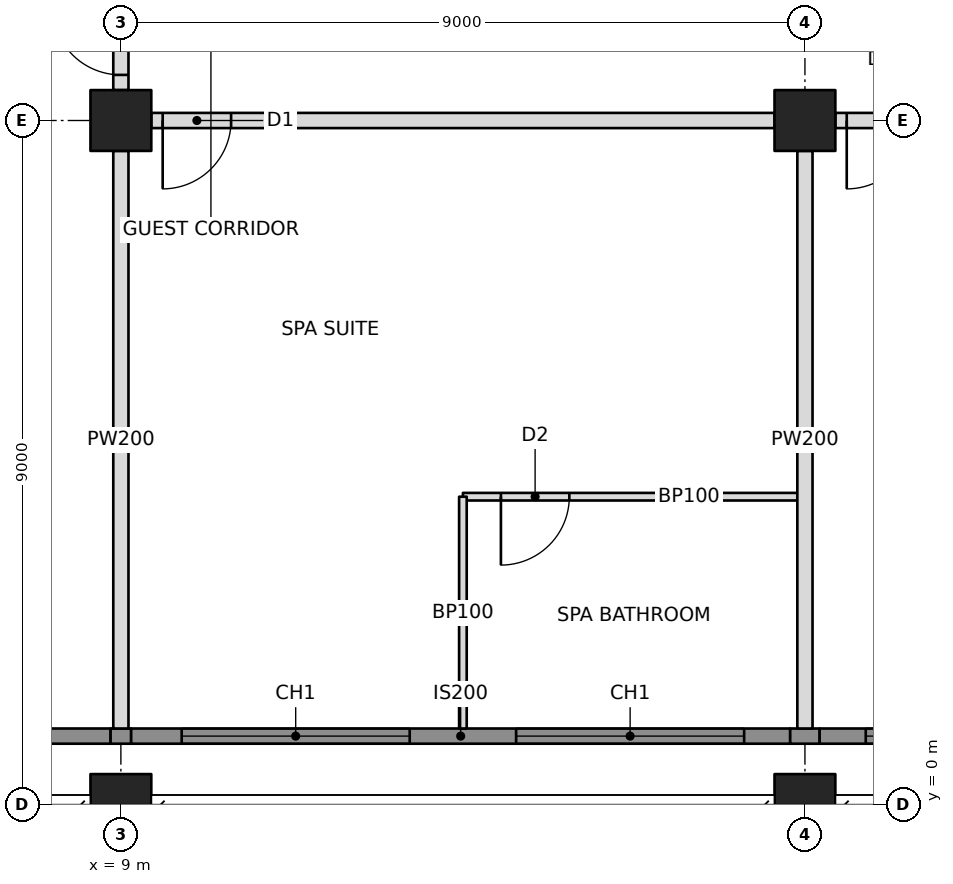
"""IFC4 building model, lengths in metres.
Left out: names, types, materials, properties, quantities, classifications, styles, units other than length and angle.
Written with IfcOpenShell. Run it as: python <this file> out.ifc"""

import sys

from ifc_helpers import new_model, si_unit, direction, frame, frame_2d, origin, origin_2d, place, context, subcontext, project, spatial, rectangle, hollow_rectangle, extrude, element, fill, save


model = new_model("IFC4")
c1 = context("Model", 3, precision=1e-05, world=origin(), true_north=direction((0.0, 1.0)))
c2 = subcontext(c1, "Body", "Model", "MODEL_VIEW")
j1 = project(units=[si_unit("LENGTHUNIT", "METRE"), si_unit("PLANEANGLEUNIT", "RADIAN")], contexts=[c1])
p1 = place(None, origin())
s1 = spatial("IfcSite", under=j1, at=p1, CompositionType="ELEMENT")
p2 = place(p1, origin())
s2 = spatial("IfcBuilding", under=s1, at=p2, CompositionType="ELEMENT")
p3 = place(p2, frame((0.0, 0.0, 241.0)))
s3 = spatial("IfcBuildingStorey", under=s2, at=p3, CompositionType="ELEMENT", Elevation=241.0)
p4 = place(p3, frame((9.0, 0.0, 0.0), z_axis=(0.0, 0.0, 1.0), x_axis=(1.0, 0.0, 0.0)))
e1 = element("IfcColumn", 1, at=p4, inside=s3, PredefinedType="COLUMN", context=c2, shape_type="SweptSolid", body=[
    extrude(hollow_rectangle(XDim=0.8, YDim=0.8, WallThickness=0.05, at=origin_2d()), origin(), (0.0, 0.0, 1.0), 3.6),
])
p5 = place(p3, frame((9.0, 9.0, 0.0), z_axis=(0.0, 0.0, 1.0), x_axis=(1.0, 0.0, 0.0)))
e2 = element("IfcColumn", 2, at=p5, inside=s3, PredefinedType="COLUMN", context=c2, shape_type="SweptSolid", body=[
    extrude(hollow_rectangle(XDim=0.8, YDim=0.8, WallThickness=0.04, at=origin_2d()), origin(), (0.0, 0.0, 1.0), 3.6),
])
p6 = place(p3, frame((18.0, 0.0, 0.0), z_axis=(0.0, 0.0, 1.0), x_axis=(1.0, 0.0, 0.0)))
e3 = element("IfcColumn", 3, at=p6, inside=s3, PredefinedType="COLUMN", context=c2, shape_type="SweptSolid", body=[
    extrude(hollow_rectangle(XDim=0.8, YDim=0.8, WallThickness=0.05, at=origin_2d()), origin(), (0.0, 0.0, 1.0), 3.6),
])
p7 = place(p3, frame((18.0, 9.0, 0.0), z_axis=(0.0, 0.0, 1.0), x_axis=(1.0, 0.0, 0.0)))
e4 = element("IfcColumn", 4, at=p7, inside=s3, PredefinedType="COLUMN", context=c2, shape_type="SweptSolid", body=[
    extrude(hollow_rectangle(XDim=0.8, YDim=0.8, WallThickness=0.04, at=origin_2d()), origin(), (0.0, 0.0, 1.0), 3.6),
])
p8 = place(p3, frame((3.0, 0.9, 0.0), z_axis=(0.0, 0.0, 1.0), x_axis=(1.0, 0.0, 0.0)))
e5 = element("IfcWall", 5, at=p8, inside=s3, PredefinedType="SOLIDWALL", context=c2, shape_type="SweptSolid", body=[
    extrude(rectangle(XDim=5.865, YDim=0.2, at=frame_2d((2.932, 0.0))), origin(), (0.0, 0.0, 1.0), 3.4),
])
p9 = place(p8, frame((1.45, 0.0, 0.6)))
e6 = element("IfcOpeningElement", 6, at=p9, cuts=e5, PredefinedType="OPENING", context=c2, shape_type="SweptSolid", body=[
    extrude(rectangle(XDim=3.0, YDim=2.2, at=frame_2d((1.5, 1.1))), frame((0.0, 0.11, 0.0), z_axis=(0.0, -1.0, 0.0), x_axis=(1.0, 0.0, 0.0)), (0.0, 0.0, 1.0), 0.22),
])
p10 = place(p3, frame((9.4, 9.0, 0.0), z_axis=(0.0, 0.0, 1.0), x_axis=(1.0, 0.0, 0.0)))
e7 = element("IfcWall", 7, at=p10, inside=s3, PredefinedType="PARTITIONING", context=c2, shape_type="SweptSolid", body=[
    extrude(rectangle(XDim=8.2, YDim=0.2, at=frame_2d((4.1, 0.0))), origin(), (0.0, 0.0, 1.0), 2.605),
])
p11 = place(p10, frame((0.15, 0.0, 0.0)))
e8 = element("IfcOpeningElement", 8, at=p11, cuts=e7, PredefinedType="OPENING", context=c2, shape_type="SweptSolid", body=[
    extrude(rectangle(XDim=0.9, YDim=2.1, at=frame_2d((0.45, 1.05))), frame((0.0, 0.11, 0.0), z_axis=(0.0, -1.0, 0.0), x_axis=(1.0, 0.0, 0.0)), (0.0, 0.0, 1.0), 0.22),
])
p12 = place(p3, frame((18.4, 9.0, 0.0), z_axis=(0.0, 0.0, 1.0), x_axis=(1.0, 0.0, 0.0)))
e9 = element("IfcWall", 9, at=p12, inside=s3, PredefinedType="PARTITIONING", context=c2, shape_type="SweptSolid", body=[
    extrude(rectangle(XDim=8.2, YDim=0.2, at=frame_2d((4.1, 0.0))), origin(), (0.0, 0.0, 1.0), 2.605),
])
p13 = place(p12, frame((0.15, 0.0, 0.0)))
e10 = element("IfcOpeningElement", 10, at=p13, cuts=e9, PredefinedType="OPENING", context=c2, shape_type="SweptSolid", body=[
    extrude(rectangle(XDim=0.9, YDim=2.1, at=frame_2d((0.45, 1.05))), frame((0.0, 0.11, 0.0), z_axis=(0.0, -1.0, 0.0), x_axis=(1.0, 0.0, 0.0)), (0.0, 0.0, 1.0), 0.22),
])
p14 = place(p3, frame((9.0, 8.6, 0.0), z_axis=(0.0, 0.0, 1.0), x_axis=(0.0, -1.0, 0.0)))
e11 = element("IfcWall", 11, at=p14, inside=s3, PredefinedType="PARTITIONING", context=c2, shape_type="SweptSolid", body=[
    extrude(rectangle(XDim=7.6, YDim=0.2, at=frame_2d((3.8, 0.0))), origin(), (0.0, 0.0, 1.0), 2.638),
])
p15 = place(p3, frame((18.0, 8.6, 0.0), z_axis=(0.0, 0.0, 1.0), x_axis=(0.0, -1.0, 0.0)))
e12 = element("IfcWall", 12, at=p15, inside=s3, PredefinedType="PARTITIONING", context=c2, shape_type="SweptSolid", body=[
    extrude(rectangle(XDim=7.6, YDim=0.2, at=frame_2d((3.8, 0.0))), origin(), (0.0, 0.0, 1.0), 2.605),
])
p16 = place(p3, frame((13.5, 4.05, 0.0), z_axis=(0.0, 0.0, 1.0), x_axis=(1.0, 0.0, 0.0)))
e13 = element("IfcWall", 13, at=p16, inside=s3, PredefinedType="PARTITIONING", context=c2, shape_type="SweptSolid", body=[
    extrude(rectangle(XDim=4.4, YDim=0.1, at=frame_2d((2.2, 0.0))), origin(), (0.0, 0.0, 1.0), 2.604),
])
p17 = place(p16, frame((0.5, 0.0, 0.0)))
e14 = element("IfcOpeningElement", 14, at=p17, cuts=e13, PredefinedType="OPENING", context=c2, shape_type="SweptSolid", body=[
    extrude(rectangle(XDim=0.9, YDim=2.1, at=frame_2d((0.45, 1.05))), frame((0.0, 0.06, 0.0), z_axis=(0.0, -1.0, 0.0), x_axis=(1.0, 0.0, 0.0)), (0.0, 0.0, 1.0), 0.12),
])
p18 = place(p3, frame((13.5, 4.05, 0.0), z_axis=(0.0, 0.0, 1.0), x_axis=(0.0, -1.0, 0.0)))
e15 = element("IfcWall", 15, at=p18, inside=s3, PredefinedType="PARTITIONING", context=c2, shape_type="SweptSolid", body=[
    extrude(rectangle(XDim=3.05, YDim=0.1, at=frame_2d((1.525, 0.0))), origin(), (0.0, 0.0, 1.0), 3.4),
])
p19 = place(p3, frame((9.0, 9.4, 0.0), z_axis=(0.0, 0.0, 1.0), x_axis=(0.0, 1.0, 0.0)))
e16 = element("IfcWall", 16, at=p19, inside=s3, PredefinedType="PARTITIONING", context=c2, shape_type="SweptSolid", body=[
    extrude(rectangle(XDim=1.3, YDim=0.2, at=frame_2d((0.65, 0.0))), origin(), (0.0, 0.0, 1.0), 2.605),
])
p20 = place(p19, frame((0.2, 0.0, 0.0)))
e17 = element("IfcOpeningElement", 17, at=p20, cuts=e16, PredefinedType="OPENING", context=c2, shape_type="SweptSolid", body=[
    extrude(rectangle(XDim=0.9, YDim=2.1, at=frame_2d((0.45, 1.05))), frame((0.0, 0.11, 0.0), z_axis=(0.0, -1.0, 0.0), x_axis=(1.0, 0.0, 0.0)), (0.0, 0.0, 1.0), 0.22),
])
p21 = place(p3, frame((8.865, 0.9, 0.0), z_axis=(0.0, 0.0, 1.0), x_axis=(1.0, 0.0, 0.0)))
e18 = element("IfcWall", 18, at=p21, inside=s3, PredefinedType="SOLIDWALL", context=c2, shape_type="SweptSolid", body=[
    extrude(rectangle(XDim=0.271, YDim=0.2, at=frame_2d((0.135, 0.0))), origin(), (0.0, 0.0, 1.0), 2.638),
])
p22 = place(p3, frame((9.135, 0.9, 0.0), z_axis=(0.0, 0.0, 1.0), x_axis=(1.0, 0.0, 0.0)))
e19 = element("IfcWall", 19, at=p22, inside=s3, PredefinedType="SOLIDWALL", context=c2, shape_type="SweptSolid", body=[
    extrude(rectangle(XDim=8.671, YDim=0.2, at=frame_2d((4.335, 0.0))), origin(), (0.0, 0.0, 1.0), 3.4),
])
p23 = place(p22, frame((0.665, 0.0, 0.6)))
e20 = element("IfcOpeningElement", 20, at=p23, cuts=e19, PredefinedType="OPENING", context=c2, shape_type="SweptSolid", body=[
    extrude(rectangle(XDim=3.0, YDim=2.2, at=frame_2d((1.5, 1.1))), frame((0.0, 0.11, 0.0), z_axis=(0.0, -1.0, 0.0), x_axis=(1.0, 0.0, 0.0)), (0.0, 0.0, 1.0), 0.22),
])
p24 = place(p22, frame((5.065, 0.0, 0.6)))
e21 = element("IfcOpeningElement", 21, at=p24, cuts=e19, PredefinedType="OPENING", context=c2, shape_type="SweptSolid", body=[
    extrude(rectangle(XDim=3.0, YDim=2.2, at=frame_2d((1.5, 1.1))), frame((0.0, 0.11, 0.0), z_axis=(0.0, -1.0, 0.0), x_axis=(1.0, 0.0, 0.0)), (0.0, 0.0, 1.0), 0.22),
])
p25 = place(p3, frame((17.806, 0.9, 0.0), z_axis=(0.0, 0.0, 1.0), x_axis=(1.0, 0.0, 0.0)))
e22 = element("IfcWall", 22, at=p25, inside=s3, PredefinedType="SOLIDWALL", context=c2, shape_type="SweptSolid", body=[
    extrude(rectangle(XDim=0.388, YDim=0.2, at=frame_2d((0.194, 0.0))), origin(), (0.0, 0.0, 1.0), 2.604),
])
p26 = place(p3, frame((18.194, 0.9, 0.0), z_axis=(0.0, 0.0, 1.0), x_axis=(1.0, 0.0, 0.0)))
e23 = element("IfcWall", 23, at=p26, inside=s3, PredefinedType="SOLIDWALL", context=c2, shape_type="SweptSolid", body=[
    extrude(rectangle(XDim=8.612, YDim=0.2, at=frame_2d((4.306, 0.0))), origin(), (0.0, 0.0, 1.0), 3.4),
])
p27 = place(p26, frame((0.606, 0.0, 0.6)))
e24 = element("IfcOpeningElement", 24, at=p27, cuts=e23, PredefinedType="OPENING", context=c2, shape_type="SweptSolid", body=[
    extrude(rectangle(XDim=3.0, YDim=2.2, at=frame_2d((1.5, 1.1))), frame((0.0, 0.11, 0.0), z_axis=(0.0, -1.0, 0.0), x_axis=(1.0, 0.0, 0.0)), (0.0, 0.0, 1.0), 0.22),
])
p28 = place(p26, frame((5.006, 0.0, 0.6)))
e25 = element("IfcOpeningElement", 25, at=p28, cuts=e23, PredefinedType="OPENING", context=c2, shape_type="SweptSolid", body=[
    extrude(rectangle(XDim=3.0, YDim=2.2, at=frame_2d((1.5, 1.1))), frame((0.0, 0.11, 0.0), z_axis=(0.0, -1.0, 0.0), x_axis=(1.0, 0.0, 0.0)), (0.0, 0.0, 1.0), 0.22),
])
p29 = place(p23, origin())
e26 = element("IfcWindow", 26, at=p29, inside=s3, PartitioningType="TRIPLE_PANEL_VERTICAL", PredefinedType="WINDOW", context=c2, shape_type="SweptSolid", body=[
    extrude(rectangle(XDim=3.0, YDim=2.2, at=frame_2d((1.5, 1.1))), frame((0.0, 0.03, 0.0), z_axis=(0.0, -1.0, 0.0), x_axis=(1.0, 0.0, 0.0)), (0.0, 0.0, 1.0), 0.06),
])
fill(e20, e26)
p30 = place(p24, origin())
e27 = element("IfcWindow", 27, at=p30, inside=s3, PartitioningType="TRIPLE_PANEL_VERTICAL", PredefinedType="WINDOW", context=c2, shape_type="SweptSolid", body=[
    extrude(rectangle(XDim=3.0, YDim=2.2, at=frame_2d((1.5, 1.1))), frame((0.0, 0.03, 0.0), z_axis=(0.0, -1.0, 0.0), x_axis=(1.0, 0.0, 0.0)), (0.0, 0.0, 1.0), 0.06),
])
fill(e21, e27)
p31 = place(p27, origin())
e28 = element("IfcWindow", 28, at=p31, inside=s3, PartitioningType="TRIPLE_PANEL_VERTICAL", PredefinedType="WINDOW", context=c2, shape_type="SweptSolid", body=[
    extrude(rectangle(XDim=3.0, YDim=2.2, at=frame_2d((1.5, 1.1))), frame((0.0, 0.03, 0.0), z_axis=(0.0, -1.0, 0.0), x_axis=(1.0, 0.0, 0.0)), (0.0, 0.0, 1.0), 0.06),
])
fill(e24, e28)
p32 = place(p17, frame((0.9, 0.0, 0.0), z_axis=(0.0, 0.0, 1.0), x_axis=(-1.0, 0.0, 0.0)))
e29 = element("IfcDoor", 29, at=p32, inside=s3, OperationType="SINGLE_SWING_RIGHT", PredefinedType="DOOR", context=c2, shape_type="SweptSolid", body=[
    extrude(rectangle(XDim=0.9, YDim=2.1, at=frame_2d((0.45, 1.05))), frame((0.0, 0.025, 0.0), z_axis=(0.0, -1.0, 0.0), x_axis=(1.0, 0.0, 0.0)), (0.0, 0.0, 1.0), 0.05),
])
fill(e14, e29)
p33 = place(p11, frame((0.9, 0.0, 0.0), z_axis=(0.0, 0.0, 1.0), x_axis=(-1.0, 0.0, 0.0)))
e30 = element("IfcDoor", 30, at=p33, inside=s3, OperationType="SINGLE_SWING_RIGHT", PredefinedType="DOOR", context=c2, shape_type="SweptSolid", body=[
    extrude(rectangle(XDim=0.9, YDim=2.1, at=frame_2d((0.45, 1.05))), frame((0.0, 0.025, 0.0), z_axis=(0.0, -1.0, 0.0), x_axis=(1.0, 0.0, 0.0)), (0.0, 0.0, 1.0), 0.05),
])
fill(e8, e30)
p34 = place(p13, frame((0.9, 0.0, 0.0), z_axis=(0.0, 0.0, 1.0), x_axis=(-1.0, 0.0, 0.0)))
e31 = element("IfcDoor", 31, at=p34, inside=s3, OperationType="SINGLE_SWING_RIGHT", PredefinedType="DOOR", context=c2, shape_type="SweptSolid", body=[
    extrude(rectangle(XDim=0.9, YDim=2.1, at=frame_2d((0.45, 1.05))), frame((0.0, 0.025, 0.0), z_axis=(0.0, -1.0, 0.0), x_axis=(1.0, 0.0, 0.0)), (0.0, 0.0, 1.0), 0.05),
])
fill(e10, e31)
p35 = place(p20, origin())
e32 = element("IfcDoor", 32, at=p35, inside=s3, OperationType="SINGLE_SWING_RIGHT", PredefinedType="DOOR", context=c2, shape_type="SweptSolid", body=[
    extrude(rectangle(XDim=0.9, YDim=2.1, at=frame_2d((0.45, 1.05))), frame((0.0, 0.025, 0.0), z_axis=(0.0, -1.0, 0.0), x_axis=(1.0, 0.0, 0.0)), (0.0, 0.0, 1.0), 0.05),
])
fill(e17, e32)
save(model, sys.argv[1])
